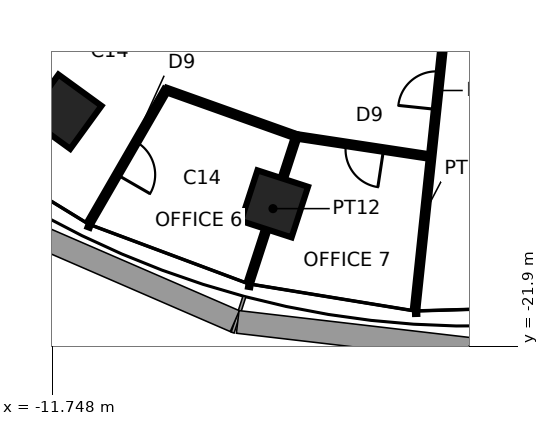
"""IFC4 building model, lengths in metres.
Left out: names, types, materials, properties, quantities, classifications, styles, units other than length and angle.
Written with IfcOpenShell. Run it as: python <this file> out.ifc"""

import sys

from ifc_helpers import new_model, si_unit, direction, frame, frame_2d, origin, origin_2d, place, context, subcontext, project, spatial, rectangle, extrude, element, fill, save


model = new_model("IFC4")
c1 = context("Model", 3, precision=1e-05, world=origin(), true_north=direction((0.0, 1.0)))
c2 = subcontext(c1, "Body", "Model", "MODEL_VIEW")
j1 = project(units=[si_unit("LENGTHUNIT", "METRE"), si_unit("PLANEANGLEUNIT", "RADIAN")], contexts=[c1])
p1 = place(None, origin())
s1 = spatial("IfcSite", under=j1, at=p1, CompositionType="ELEMENT")
p2 = place(p1, origin())
s2 = spatial("IfcBuilding", under=s1, at=p2, CompositionType="ELEMENT")
p3 = place(p2, frame((0.0, 0.0, 187.7)))
s3 = spatial("IfcBuildingStorey", under=s2, at=p3, CompositionType="ELEMENT", Elevation=187.7)
for number, where, z_axis, x_axis in (
    (1, (-11.43, -15.733, 0.0), (0.0, 0.0, 1.0), (-0.588, -0.809, 0.0)),
    (2, (-5.9, -18.157, 0.0), (0.0, 0.0, 1.0), (-0.309, -0.951, 0.0)),
):
    element("IfcColumn", number, at=place(p3, frame(where, z_axis=z_axis, x_axis=x_axis)), inside=s3, PredefinedType="COLUMN", context=c2, shape_type="SweptSolid", body=[
        extrude(rectangle(XDim=1.4, YDim=1.4, at=origin_2d()), origin(), (0.0, 0.0, 1.0), 3.9),
    ])
p4 = place(p3, frame((-8.751, -15.158, 0.0), z_axis=(0.0, 0.0, 1.0), x_axis=(-0.49999894854, -0.866026010844, 0.0)))
e3 = element("IfcWall", 3, at=p4, inside=s3, PredefinedType="PARTITIONING", context=c2, shape_type="SweptSolid", body=[
    extrude(rectangle(XDim=4.0, YDim=0.12, at=frame_2d((2.0, 0.0))), origin(), (0.0, 0.0, 1.0), 3.74),
])
p5 = place(p4, frame((1.577, 0.0, 0.0)))
e4 = element("IfcOpeningElement", 4, at=p5, cuts=e3, PredefinedType="OPENING", context=c2, shape_type="SweptSolid", body=[
    extrude(rectangle(XDim=1.0, YDim=2.4, at=frame_2d((0.5, 1.2))), frame((0.0, 0.07, 0.0), z_axis=(0.0, -1.0, 0.0), x_axis=(1.0, 0.0, 0.0)), (0.0, 0.0, 1.0), 0.14),
])
p6 = place(p3, frame((-5.322, -16.38, 0.0), z_axis=(0.0, 0.0, 1.0), x_axis=(-0.94192080639, 0.335835070369, 0.0)))
e5 = element("IfcWall", 5, at=p6, inside=s3, PredefinedType="PARTITIONING", context=c2, shape_type="SweptSolid", body=[
    extrude(rectangle(XDim=3.641, YDim=0.12, at=frame_2d((1.82, 0.0))), origin(), (0.0, 0.0, 1.0), 3.74),
])
p7 = place(p3, frame((-5.322, -16.38, 0.0), z_axis=(0.0, 0.0, 1.0), x_axis=(-0.3090046493, -0.951060527364, 0.0)))
e6 = element("IfcWall", 6, at=p7, inside=s3, PredefinedType="PARTITIONING", context=c2, shape_type="SweptSolid", body=[
    extrude(rectangle(XDim=4.0, YDim=0.12, at=frame_2d((2.0, 0.0))), origin(), (0.0, 0.0, 1.0), 3.04),
])
p8 = place(p3, frame((-1.778, -16.918, 0.0), z_axis=(0.0, 0.0, 1.0), x_axis=(-0.988689198666, 0.149978893322, 0.0)))
e7 = element("IfcWall", 7, at=p8, inside=s3, PredefinedType="PARTITIONING", context=c2, shape_type="SweptSolid", body=[
    extrude(rectangle(XDim=3.584, YDim=0.12, at=frame_2d((1.792, 0.0))), origin(), (0.0, 0.0, 1.0), 3.74),
])
p9 = place(p8, frame((1.267, 0.0, 0.0)))
e8 = element("IfcOpeningElement", 8, at=p9, cuts=e7, PredefinedType="OPENING", context=c2, shape_type="SweptSolid", body=[
    extrude(rectangle(XDim=1.0, YDim=2.4, at=frame_2d((0.5, 1.2))), frame((0.0, 0.07, 0.0), z_axis=(0.0, -1.0, 0.0), x_axis=(1.0, 0.0, 0.0)), (0.0, 0.0, 1.0), 0.14),
])
p10 = place(p3, frame((-2.196, -20.896, 0.0), z_axis=(0.0, 0.0, 1.0), x_axis=(0.104527293836, 0.99452201828, 0.0)))
e9 = element("IfcWall", 9, at=p10, inside=s3, PredefinedType="PARTITIONING", context=c2, shape_type="SweptSolid", body=[
    extrude(rectangle(XDim=11.459, YDim=0.12, at=frame_2d((5.729, 0.0))), origin(), (0.0, 0.0, 1.0), 3.74),
])
p11 = place(p10, frame((5.254, 0.0, 0.0)))
e10 = element("IfcOpeningElement", 10, at=p11, cuts=e9, PredefinedType="OPENING", context=c2, shape_type="SweptSolid", body=[
    extrude(rectangle(XDim=1.0, YDim=2.4, at=frame_2d((0.5, 1.2))), frame((0.0, 0.07, 0.0), z_axis=(0.0, -1.0, 0.0), x_axis=(1.0, 0.0, 0.0)), (0.0, 0.0, 1.0), 0.14),
])
p12 = place(p5, origin())
e11 = element("IfcDoor", 11, at=p12, inside=s3, OperationType="SINGLE_SWING_RIGHT", PredefinedType="DOOR", context=c2, shape_type="SweptSolid", body=[
    extrude(rectangle(XDim=1.0, YDim=2.4, at=frame_2d((0.5, 1.2))), frame((0.0, 0.025, 0.0), z_axis=(0.0, -1.0, 0.0), x_axis=(1.0, 0.0, 0.0)), (0.0, 0.0, 1.0), 0.05),
])
fill(e4, e11)
p13 = place(p9, origin())
e12 = element("IfcDoor", 12, at=p13, inside=s3, OperationType="SINGLE_SWING_LEFT", PredefinedType="DOOR", context=c2, shape_type="SweptSolid", body=[
    extrude(rectangle(XDim=1.0, YDim=2.4, at=frame_2d((0.5, 1.2))), frame((0.0, 0.025, 0.0), z_axis=(0.0, -1.0, 0.0), x_axis=(1.0, 0.0, 0.0)), (0.0, 0.0, 1.0), 0.05),
])
fill(e8, e12)
p14 = place(p11, origin())
e13 = element("IfcDoor", 13, at=p14, inside=s3, OperationType="SINGLE_SWING_LEFT", PredefinedType="DOOR", context=c2, shape_type="SweptSolid", body=[
    extrude(rectangle(XDim=1.0, YDim=2.4, at=frame_2d((0.5, 1.2))), frame((0.0, 0.025, 0.0), z_axis=(0.0, -1.0, 0.0), x_axis=(1.0, 0.0, 0.0)), (0.0, 0.0, 1.0), 0.05),
])
fill(e10, e13)
save(model, sys.argv[1])
